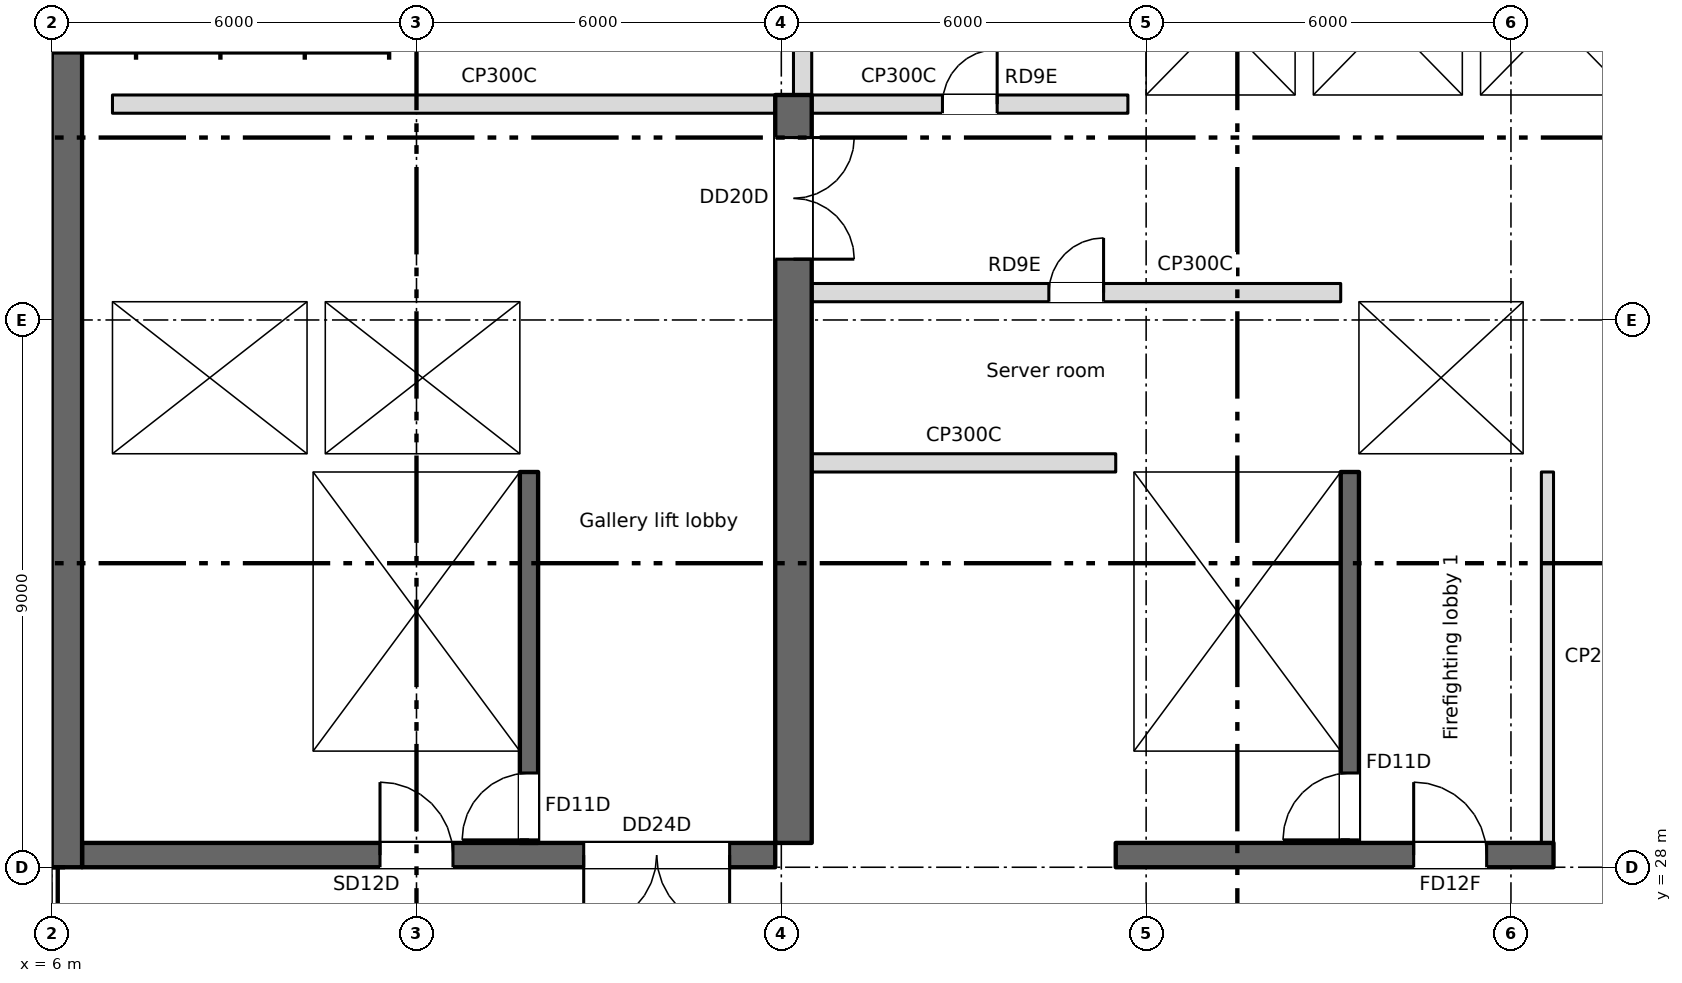
"""IFC4 building model, lengths in metres.
Left out: names, types, materials, properties, quantities, classifications, styles, units other than length and angle.
Written with IfcOpenShell. Run it as: python <this file> out.ifc"""

import sys

from ifc_helpers import new_model, si_unit, direction, frame, frame_2d, origin, place, context, subcontext, project, spatial, rectangle, extrude, element, fill, save


model = new_model("IFC4")
c1 = context("Model", 3, precision=1e-05, world=origin(), true_north=direction((0.0, 1.0)))
c2 = subcontext(c1, "Body", "Model", "MODEL_VIEW")
j1 = project(units=[si_unit("LENGTHUNIT", "METRE"), si_unit("PLANEANGLEUNIT", "RADIAN")], contexts=[c1])
p1 = place(None, origin())
s1 = spatial("IfcSite", under=j1, at=p1, CompositionType="ELEMENT")
p2 = place(p1, origin())
s2 = spatial("IfcBuilding", under=s1, at=p2, CompositionType="ELEMENT")
p3 = place(p2, frame((0.0, 0.0, 265.95)))
s3 = spatial("IfcBuildingStorey", under=s2, at=p3, CompositionType="ELEMENT", Elevation=265.95)
p4 = place(p3, frame((6.25, 28.0, 0.0), z_axis=(0.0, 0.0, 1.0), x_axis=(0.0, 1.0, 0.0)))
e1 = element("IfcWall", 1, at=p4, inside=s3, PredefinedType="SHEAR", context=c2, shape_type="SweptSolid", body=[
    extrude(rectangle(XDim=13.5, YDim=0.5, at=frame_2d((6.75, 0.0))), origin(), (0.0, 0.0, 1.0), 5.4),
])
p5 = place(p3, frame((10.15, 28.4, 0.0), z_axis=(0.0, 0.0, 1.0), x_axis=(0.0, 1.0, 0.0)))
e2 = element("IfcWall", 2, at=p5, inside=s3, PredefinedType="SHEAR", context=c2, shape_type="SweptSolid", body=[
    extrude(rectangle(XDim=6.1, YDim=0.3, at=frame_2d((3.05, 0.0))), origin(), (0.0, 0.0, 1.0), 5.4),
])
p6 = place(p3, frame((13.85, 28.4, 0.0), z_axis=(0.0, 0.0, 1.0), x_axis=(0.0, 1.0, 0.0)))
e3 = element("IfcWall", 3, at=p6, inside=s3, PredefinedType="SHEAR", context=c2, shape_type="SweptSolid", body=[
    extrude(rectangle(XDim=6.1, YDim=0.3, at=frame_2d((3.05, 0.0))), origin(), (0.0, 0.0, 1.0), 5.4),
])
p7 = place(p6, frame((0.05, 0.0, 0.0)))
e4 = element("IfcOpeningElement", 4, at=p7, cuts=e3, PredefinedType="OPENING", context=c2, shape_type="SweptSolid", body=[
    extrude(rectangle(XDim=1.1, YDim=2.1, at=frame_2d((0.55, 1.05))), frame((0.0, 0.16, 0.0), z_axis=(0.0, -1.0, 0.0), x_axis=(1.0, 0.0, 0.0)), (0.0, 0.0, 1.0), 0.32),
])
p8 = place(p3, frame((23.65, 28.4, 0.0), z_axis=(0.0, 0.0, 1.0), x_axis=(0.0, 1.0, 0.0)))
e5 = element("IfcWall", 5, at=p8, inside=s3, PredefinedType="SHEAR", context=c2, shape_type="SweptSolid", body=[
    extrude(rectangle(XDim=6.1, YDim=0.3, at=frame_2d((3.05, 0.0))), origin(), (0.0, 0.0, 1.0), 5.4),
])
p9 = place(p3, frame((27.35, 28.4, 0.0), z_axis=(0.0, 0.0, 1.0), x_axis=(0.0, 1.0, 0.0)))
e6 = element("IfcWall", 6, at=p9, inside=s3, PredefinedType="SHEAR", context=c2, shape_type="SweptSolid", body=[
    extrude(rectangle(XDim=6.1, YDim=0.3, at=frame_2d((3.05, 0.0))), origin(), (0.0, 0.0, 1.0), 5.4),
])
p10 = place(p9, frame((0.05, 0.0, 0.0)))
e7 = element("IfcOpeningElement", 7, at=p10, cuts=e6, PredefinedType="OPENING", context=c2, shape_type="SweptSolid", body=[
    extrude(rectangle(XDim=1.1, YDim=2.1, at=frame_2d((0.55, 1.05))), frame((0.0, 0.16, 0.0), z_axis=(0.0, -1.0, 0.0), x_axis=(1.0, 0.0, 0.0)), (0.0, 0.0, 1.0), 0.32),
])
p11 = place(p3, frame((23.5, 28.2, 0.0), z_axis=(0.0, 0.0, 1.0), x_axis=(1.0, 0.0, 0.0)))
e8 = element("IfcWall", 8, at=p11, inside=s3, PredefinedType="SHEAR", context=c2, shape_type="SweptSolid", body=[
    extrude(rectangle(XDim=7.2, YDim=0.4, at=frame_2d((3.6, 0.0))), origin(), (0.0, 0.0, 1.0), 5.4),
])
p12 = place(p11, frame((4.9, 0.0, 0.0)))
e9 = element("IfcOpeningElement", 9, at=p12, cuts=e8, PredefinedType="OPENING", context=c2, shape_type="SweptSolid", body=[
    extrude(rectangle(XDim=1.2, YDim=2.1, at=frame_2d((0.6, 1.05))), frame((0.0, 0.21, 0.0), z_axis=(0.0, -1.0, 0.0), x_axis=(1.0, 0.0, 0.0)), (0.0, 0.0, 1.0), 0.42),
])
p13 = place(p3, frame((23.5, 34.65, 0.0), z_axis=(0.0, 0.0, 1.0), x_axis=(1.0, 0.0, 0.0)))
e10 = element("IfcWall", 10, at=p13, inside=s3, PredefinedType="SHEAR", context=c2, shape_type="SweptSolid", body=[
    extrude(rectangle(XDim=7.2, YDim=0.3, at=frame_2d((3.6, 0.0))), origin(), (0.0, 0.0, 1.0), 5.4),
])
p14 = place(p13, frame((4.8, 0.0, 0.0)))
e11 = element("IfcOpeningElement", 11, at=p14, cuts=e10, PredefinedType="OPENING", context=c2, shape_type="SweptSolid", body=[
    extrude(rectangle(XDim=1.1, YDim=2.1, at=frame_2d((0.55, 1.05))), frame((0.0, 0.16, 0.0), z_axis=(0.0, -1.0, 0.0), x_axis=(1.0, 0.0, 0.0)), (0.0, 0.0, 1.0), 0.32),
])
p15 = place(p3, frame((30.6, 28.4, 0.0), z_axis=(0.0, 0.0, 1.0), x_axis=(0.0, 1.0, 0.0)))
e12 = element("IfcWall", 12, at=p15, inside=s3, PredefinedType="PARTITIONING", context=c2, shape_type="SweptSolid", body=[
    extrude(rectangle(XDim=6.1, YDim=0.2, at=frame_2d((3.05, 0.0))), origin(), (0.0, 0.0, 1.0), 5.4),
])
p16 = place(p3, frame((6.5, 28.2, 0.0), z_axis=(0.0, 0.0, 1.0), x_axis=(1.0, 0.0, 0.0)))
e13 = element("IfcWall", 13, at=p16, inside=s3, PredefinedType="SHEAR", context=c2, shape_type="SweptSolid", body=[
    extrude(rectangle(XDim=11.4, YDim=0.4, at=frame_2d((5.7, 0.0))), origin(), (0.0, 0.0, 1.0), 5.4),
])
p17 = place(p16, frame((4.9, 0.0, 0.0)))
e14 = element("IfcOpeningElement", 14, at=p17, cuts=e13, PredefinedType="OPENING", context=c2, shape_type="SweptSolid", body=[
    extrude(rectangle(XDim=1.2, YDim=2.1, at=frame_2d((0.6, 1.05))), frame((0.0, 0.21, 0.0), z_axis=(0.0, -1.0, 0.0), x_axis=(1.0, 0.0, 0.0)), (0.0, 0.0, 1.0), 0.42),
])
p18 = place(p16, frame((8.25, 0.0, 0.0)))
e15 = element("IfcOpeningElement", 15, at=p18, cuts=e13, PredefinedType="OPENING", context=c2, shape_type="SweptSolid", body=[
    extrude(rectangle(XDim=2.4, YDim=2.1, at=frame_2d((1.2, 1.05))), frame((0.0, 0.21, 0.0), z_axis=(0.0, -1.0, 0.0), x_axis=(1.0, 0.0, 0.0)), (0.0, 0.0, 1.0), 0.42),
])
p19 = place(p3, frame((6.75, 28.4, 0.0), z_axis=(0.0, 0.0, 1.0), x_axis=(0.0, 1.0, 0.0)))
e16 = element("IfcWall", 16, at=p19, inside=s3, PredefinedType="SHEAR", context=c2, shape_type="SweptSolid", body=[
    extrude(rectangle(XDim=12.3, YDim=0.5, at=frame_2d((6.15, 0.0))), origin(), (0.0, 0.0, 1.0), 5.4),
])
p20 = place(p3, frame((18.2, 40.7, 0.0), z_axis=(0.0, 0.0, 1.0), x_axis=(0.0, -1.0, 0.0)))
e17 = element("IfcWall", 17, at=p20, inside=s3, PredefinedType="SHEAR", context=c2, shape_type="SweptSolid", body=[
    extrude(rectangle(XDim=12.3, YDim=0.6, at=frame_2d((6.15, 0.0))), origin(), (0.0, 0.0, 1.0), 5.4),
])
p21 = place(p20, frame((0.7, 0.0, 0.0)))
e18 = element("IfcOpeningElement", 18, at=p21, cuts=e17, PredefinedType="OPENING", context=c2, shape_type="SweptSolid", body=[
    extrude(rectangle(XDim=2.0, YDim=2.1, at=frame_2d((1.0, 1.05))), frame((0.0, 0.31, 0.0), z_axis=(0.0, -1.0, 0.0), x_axis=(1.0, 0.0, 0.0)), (0.0, 0.0, 1.0), 0.62),
])
p22 = place(p3, frame((7.0, 40.55, 0.0), z_axis=(0.0, 0.0, 1.0), x_axis=(1.0, 0.0, 0.0)))
e19 = element("IfcWall", 19, at=p22, inside=s3, PredefinedType="PARTITIONING", context=c2, shape_type="SweptSolid", body=[
    extrude(rectangle(XDim=10.9, YDim=0.3, at=frame_2d((5.45, 0.0))), origin(), (0.0, 0.0, 1.0), 5.4),
])
p23 = place(p3, frame((13.85, 34.8, 0.0), z_axis=(0.0, 0.0, 1.0), x_axis=(0.0, 1.0, 0.0)))
e20 = element("IfcWall", 20, at=p23, inside=s3, PredefinedType="SHEAR", context=c2, shape_type="SweptSolid", body=[
    extrude(rectangle(XDim=2.5, YDim=0.3, at=frame_2d((1.25, 0.0))), origin(), (0.0, 0.0, 1.0), 5.4),
])
p24 = place(p3, frame((7.0, 34.65, 0.0), z_axis=(0.0, 0.0, 1.0), x_axis=(1.0, 0.0, 0.0)))
e21 = element("IfcWall", 21, at=p24, inside=s3, PredefinedType="SHEAR", context=c2, shape_type="SweptSolid", body=[
    extrude(rectangle(XDim=7.0, YDim=0.3, at=frame_2d((3.5, 0.0))), origin(), (0.0, 0.0, 1.0), 5.4),
])
p25 = place(p3, frame((7.0, 37.45, 0.0), z_axis=(0.0, 0.0, 1.0), x_axis=(1.0, 0.0, 0.0)))
e22 = element("IfcWall", 22, at=p25, inside=s3, PredefinedType="SHEAR", context=c2, shape_type="SweptSolid", body=[
    extrude(rectangle(XDim=7.0, YDim=0.3, at=frame_2d((3.5, 0.0))), origin(), (0.0, 0.0, 1.0), 5.4),
])
p26 = place(p25, frame((1.05, 0.0, 0.0)))
e23 = element("IfcOpeningElement", 23, at=p26, cuts=e22, PredefinedType="OPENING", context=c2, shape_type="SweptSolid", body=[
    extrude(rectangle(XDim=1.1, YDim=2.1, at=frame_2d((0.55, 1.05))), frame((0.0, 0.16, 0.0), z_axis=(0.0, -1.0, 0.0), x_axis=(1.0, 0.0, 0.0)), (0.0, 0.0, 1.0), 0.32),
])
p27 = place(p25, frame((4.55, 0.0, 0.0)))
e24 = element("IfcOpeningElement", 24, at=p27, cuts=e22, PredefinedType="OPENING", context=c2, shape_type="SweptSolid", body=[
    extrude(rectangle(XDim=1.1, YDim=2.1, at=frame_2d((0.55, 1.05))), frame((0.0, 0.16, 0.0), z_axis=(0.0, -1.0, 0.0), x_axis=(1.0, 0.0, 0.0)), (0.0, 0.0, 1.0), 0.32),
])
p28 = place(p3, frame((10.35, 34.8, 0.0), z_axis=(0.0, 0.0, 1.0), x_axis=(0.0, 1.0, 0.0)))
e25 = element("IfcWall", 25, at=p28, inside=s3, PredefinedType="SHEAR", context=c2, shape_type="SweptSolid", body=[
    extrude(rectangle(XDim=2.5, YDim=0.3, at=frame_2d((1.25, 0.0))), origin(), (0.0, 0.0, 1.0), 5.4),
])
p29 = place(p3, frame((23.7, 40.55, 0.0), z_axis=(0.0, 0.0, 1.0), x_axis=(1.0, 0.0, 0.0)))
e26 = element("IfcWall", 26, at=p29, inside=s3, PredefinedType="SHEAR", context=c2, shape_type="SweptSolid", body=[
    extrude(rectangle(XDim=8.55, YDim=0.3, at=frame_2d((4.275, 0.0))), origin(), (0.0, 0.0, 1.0), 5.1),
])
p30 = place(p29, frame((0.975, 0.0, 0.0)))
e27 = element("IfcOpeningElement", 27, at=p30, cuts=e26, PredefinedType="OPENING", context=c2, shape_type="SweptSolid", body=[
    extrude(rectangle(XDim=1.1, YDim=2.1, at=frame_2d((0.55, 1.05))), frame((0.0, 0.16, 0.0), z_axis=(0.0, -1.0, 0.0), x_axis=(1.0, 0.0, 0.0)), (0.0, 0.0, 1.0), 0.32),
])
p31 = place(p29, frame((3.725, 0.0, 0.0)))
e28 = element("IfcOpeningElement", 28, at=p31, cuts=e26, PredefinedType="OPENING", context=c2, shape_type="SweptSolid", body=[
    extrude(rectangle(XDim=1.1, YDim=2.1, at=frame_2d((0.55, 1.05))), frame((0.0, 0.16, 0.0), z_axis=(0.0, -1.0, 0.0), x_axis=(1.0, 0.0, 0.0)), (0.0, 0.0, 1.0), 0.32),
])
p32 = place(p29, frame((6.475, 0.0, 0.0)))
e29 = element("IfcOpeningElement", 29, at=p32, cuts=e26, PredefinedType="OPENING", context=c2, shape_type="SweptSolid", body=[
    extrude(rectangle(XDim=1.1, YDim=2.1, at=frame_2d((0.55, 1.05))), frame((0.0, 0.16, 0.0), z_axis=(0.0, -1.0, 0.0), x_axis=(1.0, 0.0, 0.0)), (0.0, 0.0, 1.0), 0.32),
])
for number, where, z_axis, x_axis in (
    (30, (23.85, 40.7, 0.0), (0.0, 0.0, 1.0), (0.0, 1.0, 0.0)),
    (31, (26.6, 40.7, 0.0), (0.0, 0.0, 1.0), (0.0, 1.0, 0.0)),
    (32, (29.35, 40.7, 0.0), (0.0, 0.0, 1.0), (0.0, 1.0, 0.0)),
):
    element("IfcWall", number, at=place(p3, frame(where, z_axis=z_axis, x_axis=x_axis)), inside=s3, PredefinedType="SHEAR", context=c2, shape_type="SweptSolid", body=[
        extrude(rectangle(XDim=2.5, YDim=0.3, at=frame_2d((1.25, 0.0))), origin(), (0.0, 0.0, 1.0), 5.1),
    ])
p33 = place(p3, frame((27.2, 37.45, 0.0), z_axis=(0.0, 0.0, 1.0), x_axis=(1.0, 0.0, 0.0)))
e33 = element("IfcWall", 33, at=p33, inside=s3, PredefinedType="SHEAR", context=c2, shape_type="SweptSolid", body=[
    extrude(rectangle(XDim=3.3, YDim=0.3, at=frame_2d((1.65, 0.0))), origin(), (0.0, 0.0, 1.0), 5.1),
])
for number, where, z_axis, x_axis in (
    (34, (27.35, 34.8, 0.0), (0.0, 0.0, 1.0), (0.0, 1.0, 0.0)),
    (35, (30.35, 34.8, 0.0), (0.0, 0.0, 1.0), (0.0, 1.0, 0.0)),
):
    element("IfcWall", number, at=place(p3, frame(where, z_axis=z_axis, x_axis=x_axis)), inside=s3, PredefinedType="SHEAR", context=c2, shape_type="SweptSolid", body=[
        extrude(rectangle(XDim=2.5, YDim=0.3, at=frame_2d((1.25, 0.0))), origin(), (0.0, 0.0, 1.0), 5.1),
    ])
p34 = place(p3, frame((18.5, 34.65, 0.0), z_axis=(0.0, 0.0, 1.0), x_axis=(1.0, 0.0, 0.0)))
e36 = element("IfcWall", 36, at=p34, inside=s3, PredefinedType="PARTITIONING", context=c2, shape_type="SweptSolid", body=[
    extrude(rectangle(XDim=5.0, YDim=0.3, at=frame_2d((2.5, 0.0))), origin(), (0.0, 0.0, 1.0), 5.4),
])
p35 = place(p3, frame((18.5, 37.45, 0.0), z_axis=(0.0, 0.0, 1.0), x_axis=(1.0, 0.0, 0.0)))
e37 = element("IfcWall", 37, at=p35, inside=s3, PredefinedType="PARTITIONING", context=c2, shape_type="SweptSolid", body=[
    extrude(rectangle(XDim=8.7, YDim=0.3, at=frame_2d((4.35, 0.0))), origin(), (0.0, 0.0, 1.0), 5.4),
])
p36 = place(p35, frame((3.9, 0.0, 0.0)))
e38 = element("IfcOpeningElement", 38, at=p36, cuts=e37, PredefinedType="OPENING", context=c2, shape_type="SweptSolid", body=[
    extrude(rectangle(XDim=0.9, YDim=2.1, at=frame_2d((0.45, 1.05))), frame((0.0, 0.16, 0.0), z_axis=(0.0, -1.0, 0.0), x_axis=(1.0, 0.0, 0.0)), (0.0, 0.0, 1.0), 0.32),
])
p37 = place(p3, frame((18.5, 40.55, 0.0), z_axis=(0.0, 0.0, 1.0), x_axis=(1.0, 0.0, 0.0)))
e39 = element("IfcWall", 39, at=p37, inside=s3, PredefinedType="PARTITIONING", context=c2, shape_type="SweptSolid", body=[
    extrude(rectangle(XDim=5.2, YDim=0.3, at=frame_2d((2.6, 0.0))), origin(), (0.0, 0.0, 1.0), 5.4),
])
p38 = place(p37, frame((2.15, 0.0, 0.0)))
e40 = element("IfcOpeningElement", 40, at=p38, cuts=e39, PredefinedType="OPENING", context=c2, shape_type="SweptSolid", body=[
    extrude(rectangle(XDim=0.9, YDim=2.1, at=frame_2d((0.45, 1.05))), frame((0.0, 0.16, 0.0), z_axis=(0.0, -1.0, 0.0), x_axis=(1.0, 0.0, 0.0)), (0.0, 0.0, 1.0), 0.32),
])
p39 = place(p3, frame((18.35, 40.7, 0.0), z_axis=(0.0, 0.0, 1.0), x_axis=(0.0, 1.0, 0.0)))
e41 = element("IfcWall", 41, at=p39, inside=s3, PredefinedType="PARTITIONING", context=c2, shape_type="SweptSolid", body=[
    extrude(rectangle(XDim=2.5, YDim=0.3, at=frame_2d((1.25, 0.0))), origin(), (0.0, 0.0, 1.0), 5.4),
])
p40 = place(p17, origin())
e42 = element("IfcDoor", 42, at=p40, inside=s3, OperationType="SINGLE_SWING_LEFT", PredefinedType="DOOR", context=c2, shape_type="SweptSolid", body=[
    extrude(rectangle(XDim=1.2, YDim=2.1, at=frame_2d((0.6, 1.05))), frame((0.0, 0.025, 0.0), z_axis=(0.0, -1.0, 0.0), x_axis=(1.0, 0.0, 0.0)), (0.0, 0.0, 1.0), 0.05),
])
fill(e14, e42)
p41 = place(p10, origin())
e43 = element("IfcDoor", 43, at=p41, inside=s3, OperationType="SINGLE_SWING_LEFT", PredefinedType="DOOR", context=c2, shape_type="SweptSolid", body=[
    extrude(rectangle(XDim=1.1, YDim=2.1, at=frame_2d((0.55, 1.05))), frame((0.0, 0.025, 0.0), z_axis=(0.0, -1.0, 0.0), x_axis=(1.0, 0.0, 0.0)), (0.0, 0.0, 1.0), 0.05),
])
fill(e7, e43)
p42 = place(p12, origin())
e44 = element("IfcDoor", 44, at=p42, inside=s3, OperationType="SINGLE_SWING_LEFT", PredefinedType="DOOR", context=c2, shape_type="SweptSolid", body=[
    extrude(rectangle(XDim=1.2, YDim=2.1, at=frame_2d((0.6, 1.05))), frame((0.0, 0.025, 0.0), z_axis=(0.0, -1.0, 0.0), x_axis=(1.0, 0.0, 0.0)), (0.0, 0.0, 1.0), 0.05),
])
fill(e9, e44)
p43 = place(p18, origin())
e45 = element("IfcDoor", 45, at=p43, inside=s3, OperationType="DOUBLE_DOOR_SINGLE_SWING", PredefinedType="DOOR", context=c2, shape_type="SweptSolid", body=[
    extrude(rectangle(XDim=2.4, YDim=2.1, at=frame_2d((1.2, 1.05))), frame((0.0, 0.025, 0.0), z_axis=(0.0, -1.0, 0.0), x_axis=(1.0, 0.0, 0.0)), (0.0, 0.0, 1.0), 0.05),
])
fill(e15, e45)
p44 = place(p7, origin())
e46 = element("IfcDoor", 46, at=p44, inside=s3, OperationType="SINGLE_SWING_LEFT", PredefinedType="DOOR", context=c2, shape_type="SweptSolid", body=[
    extrude(rectangle(XDim=1.1, YDim=2.1, at=frame_2d((0.55, 1.05))), frame((0.0, 0.025, 0.0), z_axis=(0.0, -1.0, 0.0), x_axis=(1.0, 0.0, 0.0)), (0.0, 0.0, 1.0), 0.05),
])
fill(e4, e46)
p45 = place(p21, origin())
e47 = element("IfcDoor", 47, at=p45, inside=s3, OperationType="DOUBLE_DOOR_SINGLE_SWING", PredefinedType="DOOR", context=c2, shape_type="SweptSolid", body=[
    extrude(rectangle(XDim=2.0, YDim=2.1, at=frame_2d((1.0, 1.05))), frame((0.0, 0.025, 0.0), z_axis=(0.0, -1.0, 0.0), x_axis=(1.0, 0.0, 0.0)), (0.0, 0.0, 1.0), 0.05),
])
fill(e18, e47)
p46 = place(p36, origin())
e48 = element("IfcDoor", 48, at=p46, inside=s3, OperationType="SINGLE_SWING_RIGHT", PredefinedType="DOOR", context=c2, shape_type="SweptSolid", body=[
    extrude(rectangle(XDim=0.9, YDim=2.1, at=frame_2d((0.45, 1.05))), frame((0.0, 0.025, 0.0), z_axis=(0.0, -1.0, 0.0), x_axis=(1.0, 0.0, 0.0)), (0.0, 0.0, 1.0), 0.05),
])
fill(e38, e48)
p47 = place(p38, origin())
e49 = element("IfcDoor", 49, at=p47, inside=s3, OperationType="SINGLE_SWING_RIGHT", PredefinedType="DOOR", context=c2, shape_type="SweptSolid", body=[
    extrude(rectangle(XDim=0.9, YDim=2.1, at=frame_2d((0.45, 1.05))), frame((0.0, 0.025, 0.0), z_axis=(0.0, -1.0, 0.0), x_axis=(1.0, 0.0, 0.0)), (0.0, 0.0, 1.0), 0.05),
])
fill(e40, e49)
p48 = place(p30, origin())
e50 = element("IfcDoor", 50, at=p48, inside=s3, OperationType="SLIDING_TO_LEFT", PredefinedType="DOOR", context=c2, shape_type="SweptSolid", body=[
    extrude(rectangle(XDim=1.1, YDim=2.1, at=frame_2d((0.55, 1.05))), frame((0.0, 0.025, 0.0), z_axis=(0.0, -1.0, 0.0), x_axis=(1.0, 0.0, 0.0)), (0.0, 0.0, 1.0), 0.05),
])
fill(e27, e50)
p49 = place(p31, origin())
e51 = element("IfcDoor", 51, at=p49, inside=s3, OperationType="SLIDING_TO_LEFT", PredefinedType="DOOR", context=c2, shape_type="SweptSolid", body=[
    extrude(rectangle(XDim=1.1, YDim=2.1, at=frame_2d((0.55, 1.05))), frame((0.0, 0.025, 0.0), z_axis=(0.0, -1.0, 0.0), x_axis=(1.0, 0.0, 0.0)), (0.0, 0.0, 1.0), 0.05),
])
fill(e28, e51)
p50 = place(p32, origin())
e52 = element("IfcDoor", 52, at=p50, inside=s3, OperationType="SLIDING_TO_LEFT", PredefinedType="DOOR", context=c2, shape_type="SweptSolid", body=[
    extrude(rectangle(XDim=1.1, YDim=2.1, at=frame_2d((0.55, 1.05))), frame((0.0, 0.025, 0.0), z_axis=(0.0, -1.0, 0.0), x_axis=(1.0, 0.0, 0.0)), (0.0, 0.0, 1.0), 0.05),
])
fill(e29, e52)
p51 = place(p26, origin())
e53 = element("IfcDoor", 53, at=p51, inside=s3, OperationType="SLIDING_TO_LEFT", PredefinedType="DOOR", context=c2, shape_type="SweptSolid", body=[
    extrude(rectangle(XDim=1.1, YDim=2.1, at=frame_2d((0.55, 1.05))), frame((0.0, 0.025, 0.0), z_axis=(0.0, -1.0, 0.0), x_axis=(1.0, 0.0, 0.0)), (0.0, 0.0, 1.0), 0.05),
])
fill(e23, e53)
p52 = place(p27, origin())
e54 = element("IfcDoor", 54, at=p52, inside=s3, OperationType="SLIDING_TO_LEFT", PredefinedType="DOOR", context=c2, shape_type="SweptSolid", body=[
    extrude(rectangle(XDim=1.1, YDim=2.1, at=frame_2d((0.55, 1.05))), frame((0.0, 0.025, 0.0), z_axis=(0.0, -1.0, 0.0), x_axis=(1.0, 0.0, 0.0)), (0.0, 0.0, 1.0), 0.05),
])
fill(e24, e54)
p53 = place(p14, origin())
e55 = element("IfcDoor", 55, at=p53, inside=s3, OperationType="SLIDING_TO_LEFT", PredefinedType="DOOR", context=c2, shape_type="SweptSolid", body=[
    extrude(rectangle(XDim=1.1, YDim=2.1, at=frame_2d((0.55, 1.05))), frame((0.0, 0.025, 0.0), z_axis=(0.0, -1.0, 0.0), x_axis=(1.0, 0.0, 0.0)), (0.0, 0.0, 1.0), 0.05),
])
fill(e11, e55)
save(model, sys.argv[1])
